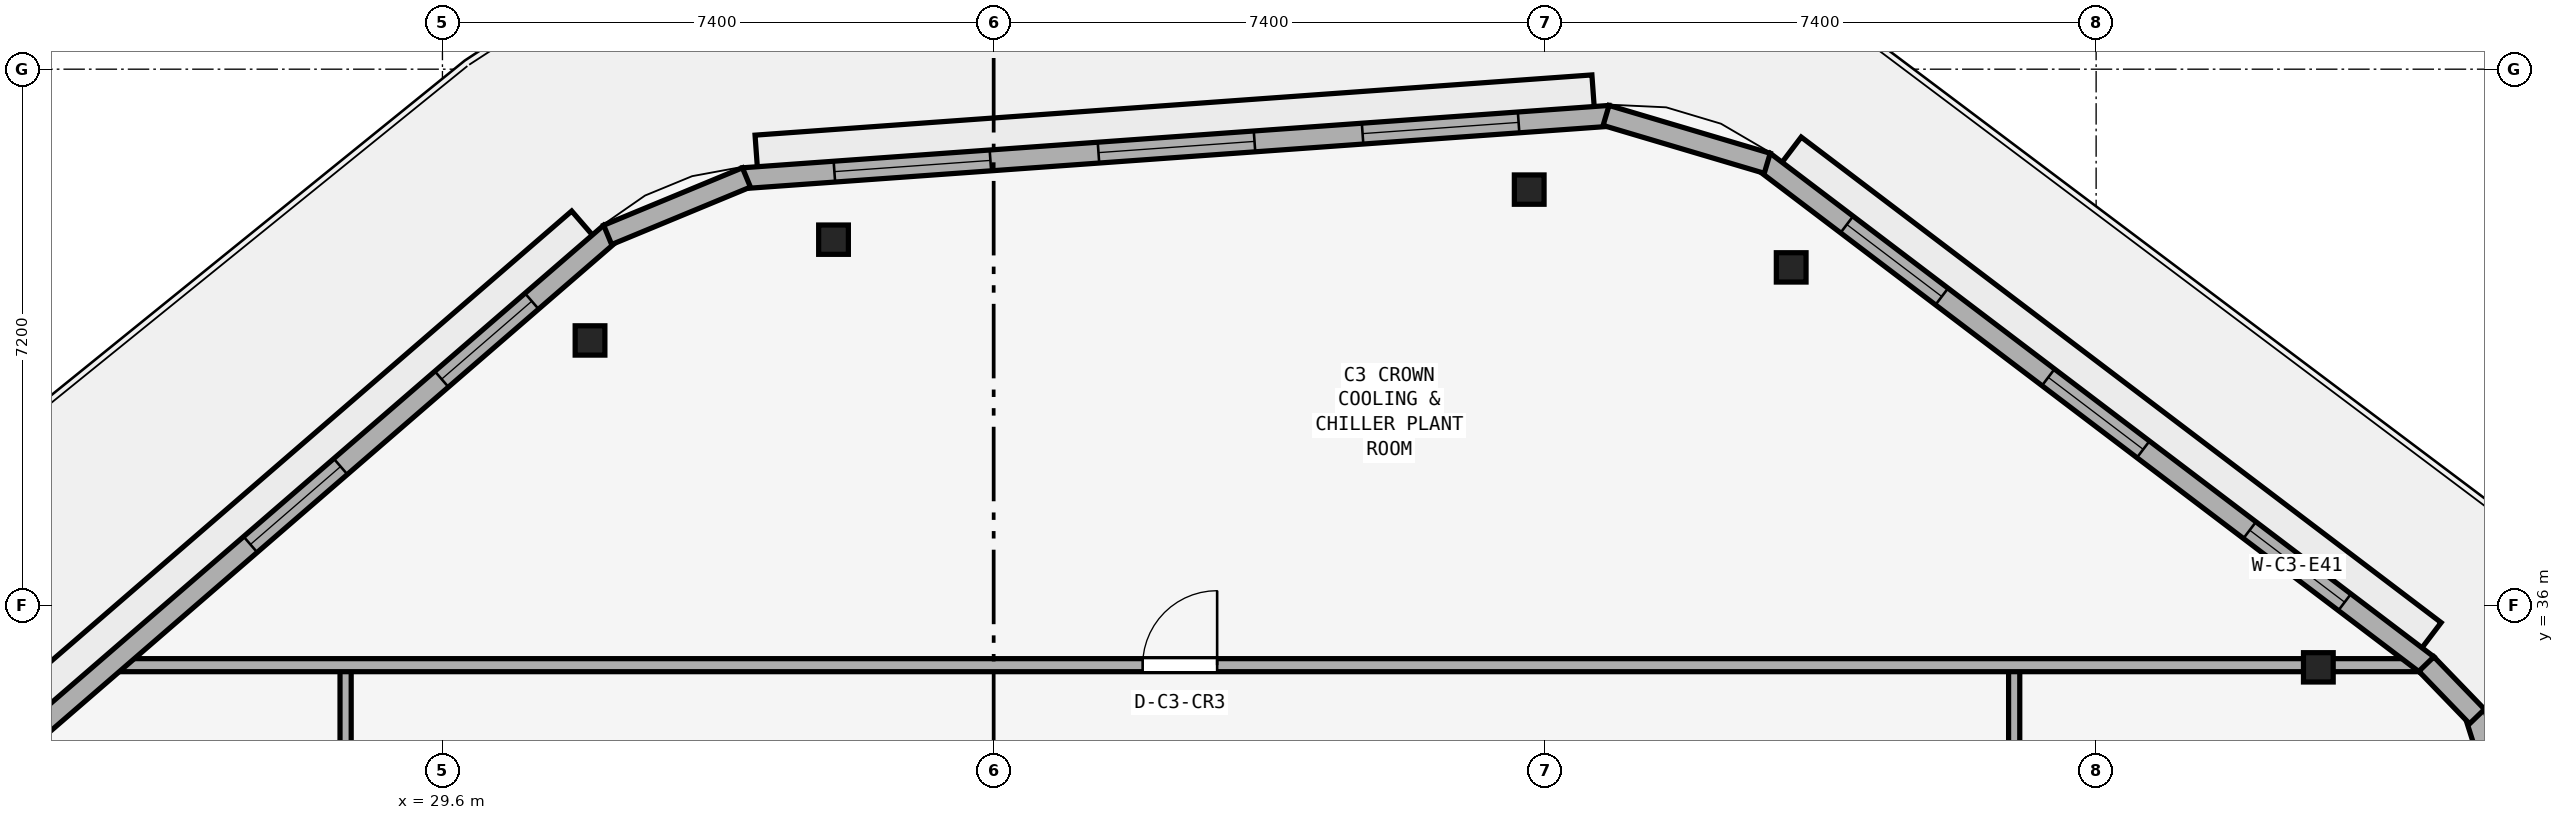
"""IFC4 building model, lengths in metres.
Left out: names, types, materials, properties, quantities, classifications, styles, units other than length and angle.
Written with IfcOpenShell. Run it as: python <this file> out.ifc"""

import sys

from ifc_helpers import new_model, si_unit, direction, frame, frame_2d, origin, origin_2d, place, context, subcontext, project, spatial, rectangle, i_section, extrude, element, fill, save


model = new_model("IFC4")
c1 = context("Model", 3, precision=1e-05, world=origin(), true_north=direction((0.0, 1.0)))
c2 = subcontext(c1, "Body", "Model", "MODEL_VIEW")
j1 = project(units=[si_unit("LENGTHUNIT", "METRE"), si_unit("PLANEANGLEUNIT", "RADIAN")], contexts=[c1])
p1 = place(None, origin())
s1 = spatial("IfcSite", under=j1, at=p1, CompositionType="ELEMENT")
p2 = place(p1, origin())
s2 = spatial("IfcBuilding", under=s1, at=p2, CompositionType="ELEMENT")
p3 = place(p2, frame((0.0, 0.0, 321.4)))
s3 = spatial("IfcBuildingStorey", under=s2, at=p3, CompositionType="ELEMENT", Elevation=321.4)
for number, where, z_axis, x_axis in (
    (1, (54.783, 35.171, 0.0), (0.0, 0.0, 1.0), (1.0, 0.0, 0.0)),
    (2, (47.706, 40.54, 0.0), (0.0, 0.0, 1.0), (1.0, 0.0, 0.0)),
    (3, (44.189, 41.583, 0.0), (0.0, 0.0, 1.0), (1.0, 0.0, 0.0)),
    (4, (34.85, 40.912, 0.0), (0.0, 0.0, 1.0), (1.0, 0.0, 0.0)),
    (5, (31.581, 39.559, 0.0), (0.0, 0.0, 1.0), (1.0, 0.0, 0.0)),
):
    element("IfcColumn", number, at=place(p3, frame(where, z_axis=z_axis, x_axis=x_axis)), inside=s3, PredefinedType="COLUMN", context=c2, shape_type="SweptSolid", body=[
        extrude(i_section(OverallWidth=0.399, OverallDepth=0.394, WebThickness=0.023, FlangeThickness=0.037, at=origin_2d()), origin(), (0.0, 0.0, 1.0), 4.0),
    ])
p4 = place(p3, frame((50.7, 15.2, 0.0), z_axis=(0.0, 0.0, 1.0), x_axis=(0.0, 1.0, 0.0)))
e6 = element("IfcWall", 6, at=p4, inside=s3, PredefinedType="PARTITIONING", context=c2, shape_type="SweptSolid", body=[
    extrude(rectangle(XDim=20.0, YDim=0.15, at=frame_2d((10.0, 0.0))), origin(), (0.0, 0.0, 1.0), 3.72),
])
p5 = place(p4, frame((9.5, 0.0, 0.0)))
e7 = element("IfcOpeningElement", 7, at=p5, cuts=e6, PredefinedType="OPENING", context=c2, shape_type="SweptSolid", body=[
    extrude(rectangle(XDim=1.0, YDim=2.12, at=frame_2d((0.5, 1.06))), frame((0.0, 0.085, 0.0), z_axis=(0.0, -1.0, 0.0), x_axis=(1.0, 0.0, 0.0)), (0.0, 0.0, 1.0), 0.17),
])
p6 = place(p3, frame((28.3, 15.2, 0.0), z_axis=(0.0, 0.0, 1.0), x_axis=(0.0, 1.0, 0.0)))
e8 = element("IfcWall", 8, at=p6, inside=s3, PredefinedType="PARTITIONING", context=c2, shape_type="SweptSolid", body=[
    extrude(rectangle(XDim=20.0, YDim=0.15, at=frame_2d((10.0, 0.0))), origin(), (0.0, 0.0, 1.0), 3.72),
])
p7 = place(p6, frame((9.5, 0.0, 0.0)))
e9 = element("IfcOpeningElement", 9, at=p7, cuts=e8, PredefinedType="OPENING", context=c2, shape_type="SweptSolid", body=[
    extrude(rectangle(XDim=1.0, YDim=2.12, at=frame_2d((0.5, 1.06))), frame((0.0, 0.085, 0.0), z_axis=(0.0, -1.0, 0.0), x_axis=(1.0, 0.0, 0.0)), (0.0, 0.0, 1.0), 0.17),
])
p8 = place(p3, frame((25.074, 35.2, 0.0), z_axis=(0.0, 0.0, 1.0), x_axis=(1.0, 0.0, 0.0)))
e10 = element("IfcWall", 10, at=p8, inside=s3, PredefinedType="PARTITIONING", context=c2, shape_type="SweptSolid", body=[
    extrude(rectangle(XDim=31.228, YDim=0.175, at=frame_2d((15.614, 0.0))), origin(), (0.0, 0.0, 1.0), 3.72),
])
p9 = place(p8, frame((13.926, 0.0, 0.0)))
e11 = element("IfcOpeningElement", 11, at=p9, cuts=e10, PredefinedType="OPENING", context=c2, shape_type="SweptSolid", body=[
    extrude(rectangle(XDim=1.0, YDim=2.12, at=frame_2d((0.5, 1.06))), frame((0.0, 0.097, 0.0), z_axis=(0.0, -1.0, 0.0), x_axis=(1.0, 0.0, 0.0)), (0.0, 0.0, 1.0), 0.195),
])
p10 = place(p3, frame((56.25, 35.201, 0.0), z_axis=(0.0, 0.0, 1.0), x_axis=(-0.796694895732, 0.60438170316, 0.0)))
e12 = element("IfcWall", 12, at=p10, inside=s3, PredefinedType="STANDARD", context=c2, shape_type="SweptSolid", body=[
    extrude(rectangle(XDim=11.183, YDim=0.28, at=frame_2d((5.591, 0.0))), origin(), (0.0, 0.0, 1.0), 3.72),
])
p11 = place(p10, frame((1.397, 0.0, 0.9)))
e13 = element("IfcOpeningElement", 13, at=p11, cuts=e12, PredefinedType="OPENING", context=c2, shape_type="SweptSolid", body=[
    extrude(rectangle(XDim=1.6, YDim=1.45, at=frame_2d((0.8, 0.725))), frame((0.0, 0.15, 0.0), z_axis=(0.0, -1.0, 0.0), x_axis=(1.0, 0.0, 0.0)), (0.0, 0.0, 1.0), 0.3),
])
p12 = place(p10, frame((4.792, 0.0, 0.9)))
e14 = element("IfcOpeningElement", 14, at=p12, cuts=e12, PredefinedType="OPENING", context=c2, shape_type="SweptSolid", body=[
    extrude(rectangle(XDim=1.6, YDim=1.45, at=frame_2d((0.8, 0.725))), frame((0.0, 0.15, 0.0), z_axis=(0.0, -1.0, 0.0), x_axis=(1.0, 0.0, 0.0)), (0.0, 0.0, 1.0), 0.3),
])
p13 = place(p10, frame((8.186, 0.0, 0.9)))
e15 = element("IfcOpeningElement", 15, at=p13, cuts=e12, PredefinedType="OPENING", context=c2, shape_type="SweptSolid", body=[
    extrude(rectangle(XDim=1.6, YDim=1.45, at=frame_2d((0.8, 0.725))), frame((0.0, 0.15, 0.0), z_axis=(0.0, -1.0, 0.0), x_axis=(1.0, 0.0, 0.0)), (0.0, 0.0, 1.0), 0.3),
])
p14 = place(p3, frame((45.271, 42.574, 0.0), z_axis=(0.0, 0.0, 1.0), x_axis=(-0.997422230833, -0.07175579029, 0.0)))
e16 = element("IfcWall", 16, at=p14, inside=s3, PredefinedType="STANDARD", context=c2, shape_type="SweptSolid", body=[
    extrude(rectangle(XDim=11.663, YDim=0.28, at=frame_2d((5.832, 0.0))), origin(), (0.0, 0.0, 1.0), 3.72),
])
p15 = place(p14, frame((1.227, 0.0, 0.9)))
e17 = element("IfcOpeningElement", 17, at=p15, cuts=e16, PredefinedType="OPENING", context=c2, shape_type="SweptSolid", body=[
    extrude(rectangle(XDim=2.1, YDim=1.7, at=frame_2d((1.05, 0.85))), frame((0.0, 0.15, 0.0), z_axis=(0.0, -1.0, 0.0), x_axis=(1.0, 0.0, 0.0)), (0.0, 0.0, 1.0), 0.3),
])
p16 = place(p14, frame((4.782, 0.0, 0.9)))
e18 = element("IfcOpeningElement", 18, at=p16, cuts=e16, PredefinedType="OPENING", context=c2, shape_type="SweptSolid", body=[
    extrude(rectangle(XDim=2.1, YDim=1.7, at=frame_2d((1.05, 0.85))), frame((0.0, 0.15, 0.0), z_axis=(0.0, -1.0, 0.0), x_axis=(1.0, 0.0, 0.0)), (0.0, 0.0, 1.0), 0.3),
])
p17 = place(p14, frame((8.336, 0.0, 0.9)))
e19 = element("IfcOpeningElement", 19, at=p17, cuts=e16, PredefinedType="OPENING", context=c2, shape_type="SweptSolid", body=[
    extrude(rectangle(XDim=2.1, YDim=1.7, at=frame_2d((1.05, 0.85))), frame((0.0, 0.15, 0.0), z_axis=(0.0, -1.0, 0.0), x_axis=(1.0, 0.0, 0.0)), (0.0, 0.0, 1.0), 0.3),
])
p18 = place(p3, frame((31.856, 40.999, 0.0), z_axis=(0.0, 0.0, 1.0), x_axis=(-0.756468872678, -0.654029697085, 0.0)))
e20 = element("IfcWall", 20, at=p18, inside=s3, PredefinedType="STANDARD", context=c2, shape_type="SweptSolid", body=[
    extrude(rectangle(XDim=11.18, YDim=0.28, at=frame_2d((5.59, 0.0))), origin(), (0.0, 0.0, 1.0), 3.72),
])
p19 = place(p18, frame((1.397, 0.0, 0.9)))
e21 = element("IfcOpeningElement", 21, at=p19, cuts=e20, PredefinedType="OPENING", context=c2, shape_type="SweptSolid", body=[
    extrude(rectangle(XDim=1.6, YDim=1.45, at=frame_2d((0.8, 0.725))), frame((0.0, 0.15, 0.0), z_axis=(0.0, -1.0, 0.0), x_axis=(1.0, 0.0, 0.0)), (0.0, 0.0, 1.0), 0.3),
])
p20 = place(p18, frame((4.79, 0.0, 0.9)))
e22 = element("IfcOpeningElement", 22, at=p20, cuts=e20, PredefinedType="OPENING", context=c2, shape_type="SweptSolid", body=[
    extrude(rectangle(XDim=1.6, YDim=1.45, at=frame_2d((0.8, 0.725))), frame((0.0, 0.15, 0.0), z_axis=(0.0, -1.0, 0.0), x_axis=(1.0, 0.0, 0.0)), (0.0, 0.0, 1.0), 0.3),
])
p21 = place(p3, frame((57.467, 32.721, 0.0), z_axis=(0.0, 0.0, 1.0), x_axis=(-0.302459091708, 0.953162366988, 0.0)))
e23 = element("IfcWall", 23, at=p21, inside=s3, PredefinedType="STANDARD", context=c2, shape_type="SweptSolid", body=[
    extrude(rectangle(XDim=1.936, YDim=0.28, at=frame_2d((0.968, 0.0))), origin(), (0.0, 0.0, 1.0), 3.72),
])
p22 = place(p3, frame((56.914, 34.511, 0.0), z_axis=(0.0, 0.0, 1.0), x_axis=(-0.694785794461, 0.719216726595, 0.0)))
e24 = element("IfcWall", 24, at=p22, inside=s3, PredefinedType="STANDARD", context=c2, shape_type="SweptSolid", body=[
    extrude(rectangle(XDim=0.979, YDim=0.28, at=frame_2d((0.49, 0.0))), origin(), (0.0, 0.0, 1.0), 3.72),
])
p23 = place(p3, frame((47.385, 41.937, 0.0), z_axis=(0.0, 0.0, 1.0), x_axis=(-0.958682364322, 0.284478688725, 0.0)))
e25 = element("IfcWall", 25, at=p23, inside=s3, PredefinedType="STANDARD", context=c2, shape_type="SweptSolid", body=[
    extrude(rectangle(XDim=2.257, YDim=0.28, at=frame_2d((1.128, 0.0))), origin(), (0.0, 0.0, 1.0), 3.72),
])
p24 = place(p3, frame((33.681, 41.747, 0.0), z_axis=(0.0, 0.0, 1.0), x_axis=(-0.924019782367, -0.382344663616, 0.0)))
e26 = element("IfcWall", 26, at=p24, inside=s3, PredefinedType="STANDARD", context=c2, shape_type="SweptSolid", body=[
    extrude(rectangle(XDim=2.017, YDim=0.28, at=frame_2d((1.008, 0.0))), origin(), (0.0, 0.0, 1.0), 3.72),
])
p25 = place(p9, origin())
e27 = element("IfcDoor", 27, at=p25, inside=s3, OperationType="SINGLE_SWING_RIGHT", PredefinedType="DOOR", context=c2, shape_type="SweptSolid", body=[
    extrude(rectangle(XDim=1.0, YDim=2.12, at=frame_2d((0.5, 1.06))), frame((0.0, 0.025, 0.0), z_axis=(0.0, -1.0, 0.0), x_axis=(1.0, 0.0, 0.0)), (0.0, 0.0, 1.0), 0.05),
])
fill(e11, e27)
p26 = place(p11, origin())
e28 = element("IfcWindow", 28, at=p26, inside=s3, PartitioningType="SINGLE_PANEL", PredefinedType="WINDOW", context=c2, shape_type="SweptSolid", body=[
    extrude(rectangle(XDim=1.6, YDim=1.45, at=frame_2d((0.8, 0.725))), frame((0.0, 0.03, 0.0), z_axis=(0.0, -1.0, 0.0), x_axis=(1.0, 0.0, 0.0)), (0.0, 0.0, 1.0), 0.06),
])
fill(e13, e28)
p27 = place(p12, origin())
e29 = element("IfcWindow", 29, at=p27, inside=s3, PartitioningType="SINGLE_PANEL", PredefinedType="WINDOW", context=c2, shape_type="SweptSolid", body=[
    extrude(rectangle(XDim=1.6, YDim=1.45, at=frame_2d((0.8, 0.725))), frame((0.0, 0.03, 0.0), z_axis=(0.0, -1.0, 0.0), x_axis=(1.0, 0.0, 0.0)), (0.0, 0.0, 1.0), 0.06),
])
fill(e14, e29)
p28 = place(p13, origin())
e30 = element("IfcWindow", 30, at=p28, inside=s3, PartitioningType="SINGLE_PANEL", PredefinedType="WINDOW", context=c2, shape_type="SweptSolid", body=[
    extrude(rectangle(XDim=1.6, YDim=1.45, at=frame_2d((0.8, 0.725))), frame((0.0, 0.03, 0.0), z_axis=(0.0, -1.0, 0.0), x_axis=(1.0, 0.0, 0.0)), (0.0, 0.0, 1.0), 0.06),
])
fill(e15, e30)
p29 = place(p15, origin())
e31 = element("IfcWindow", 31, at=p29, inside=s3, PartitioningType="SINGLE_PANEL", PredefinedType="WINDOW", context=c2, shape_type="SweptSolid", body=[
    extrude(rectangle(XDim=2.1, YDim=1.7, at=frame_2d((1.05, 0.85))), frame((0.0, 0.03, 0.0), z_axis=(0.0, -1.0, 0.0), x_axis=(1.0, 0.0, 0.0)), (0.0, 0.0, 1.0), 0.06),
])
fill(e17, e31)
p30 = place(p16, origin())
e32 = element("IfcWindow", 32, at=p30, inside=s3, PartitioningType="SINGLE_PANEL", PredefinedType="WINDOW", context=c2, shape_type="SweptSolid", body=[
    extrude(rectangle(XDim=2.1, YDim=1.7, at=frame_2d((1.05, 0.85))), frame((0.0, 0.03, 0.0), z_axis=(0.0, -1.0, 0.0), x_axis=(1.0, 0.0, 0.0)), (0.0, 0.0, 1.0), 0.06),
])
fill(e18, e32)
p31 = place(p17, origin())
e33 = element("IfcWindow", 33, at=p31, inside=s3, PartitioningType="SINGLE_PANEL", PredefinedType="WINDOW", context=c2, shape_type="SweptSolid", body=[
    extrude(rectangle(XDim=2.1, YDim=1.7, at=frame_2d((1.05, 0.85))), frame((0.0, 0.03, 0.0), z_axis=(0.0, -1.0, 0.0), x_axis=(1.0, 0.0, 0.0)), (0.0, 0.0, 1.0), 0.06),
])
fill(e19, e33)
p32 = place(p19, origin())
e34 = element("IfcWindow", 34, at=p32, inside=s3, PartitioningType="SINGLE_PANEL", PredefinedType="WINDOW", context=c2, shape_type="SweptSolid", body=[
    extrude(rectangle(XDim=1.6, YDim=1.45, at=frame_2d((0.8, 0.725))), frame((0.0, 0.03, 0.0), z_axis=(0.0, -1.0, 0.0), x_axis=(1.0, 0.0, 0.0)), (0.0, 0.0, 1.0), 0.06),
])
fill(e21, e34)
p33 = place(p20, origin())
e35 = element("IfcWindow", 35, at=p33, inside=s3, PartitioningType="SINGLE_PANEL", PredefinedType="WINDOW", context=c2, shape_type="SweptSolid", body=[
    extrude(rectangle(XDim=1.6, YDim=1.45, at=frame_2d((0.8, 0.725))), frame((0.0, 0.03, 0.0), z_axis=(0.0, -1.0, 0.0), x_axis=(1.0, 0.0, 0.0)), (0.0, 0.0, 1.0), 0.06),
])
fill(e22, e35)
save(model, sys.argv[1])
